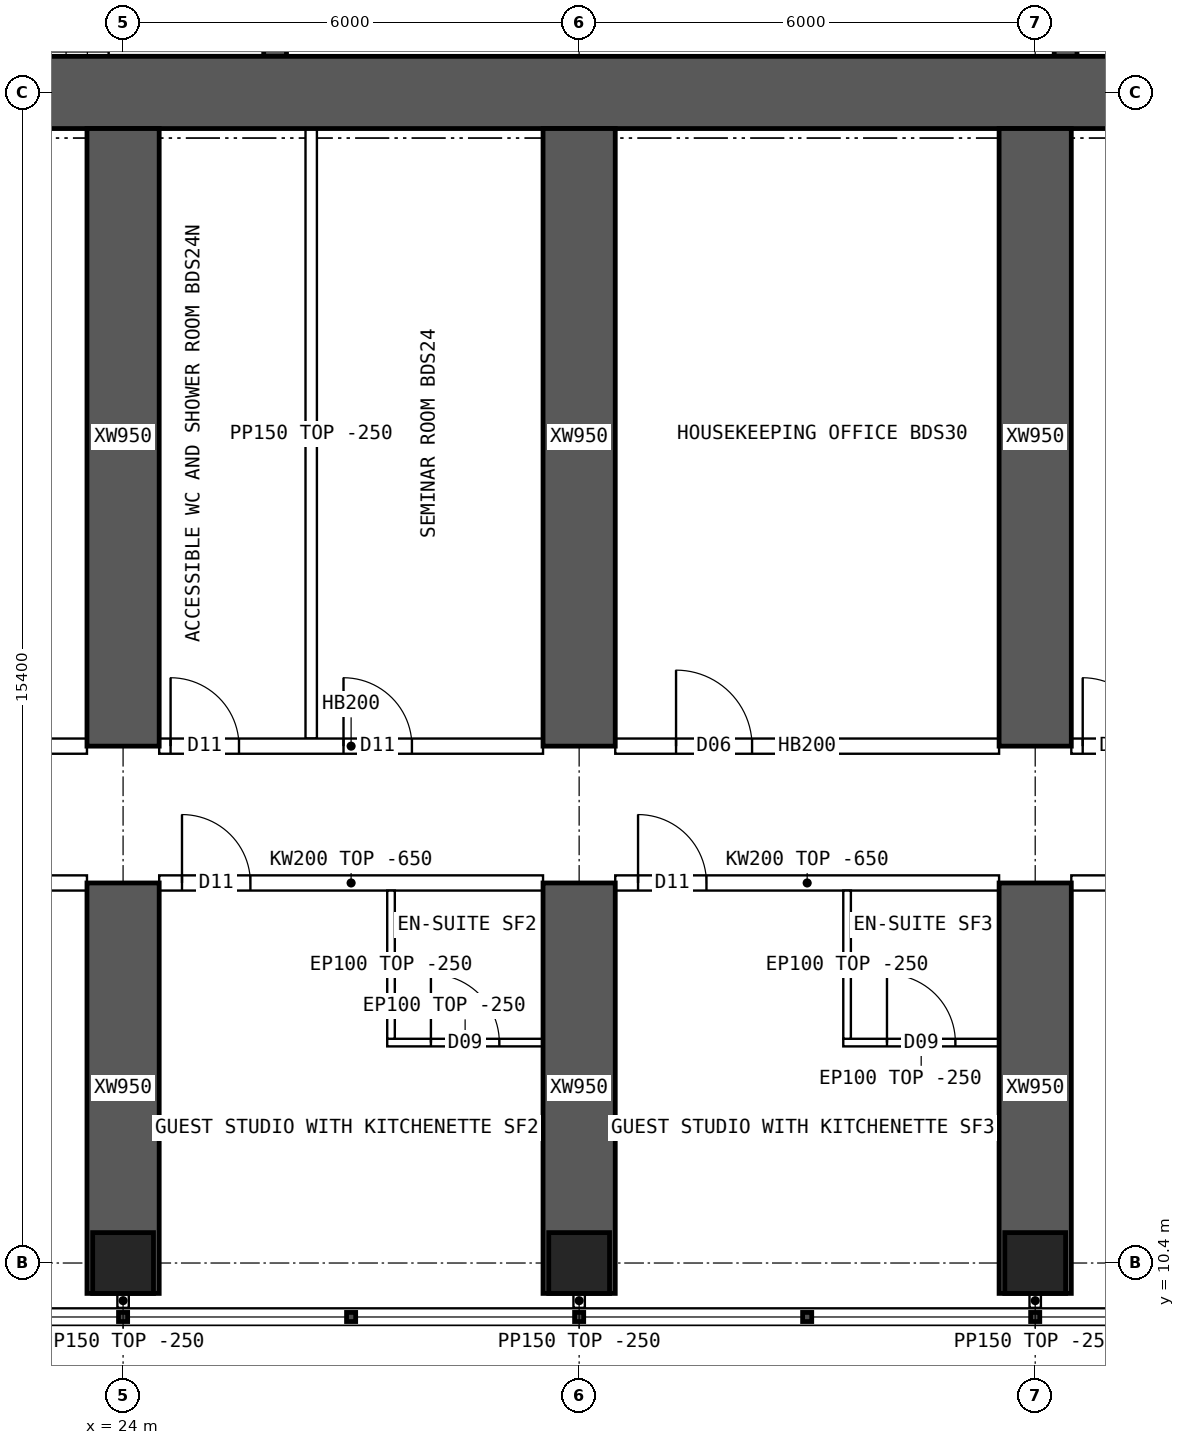
"""IFC4 building model, lengths in metres.
Left out: names, types, materials, properties, quantities, classifications, styles, units other than length and angle.
Written with IfcOpenShell. Run it as: python <this file> out.ifc"""

import sys

from ifc_helpers import new_model, si_unit, direction, frame, frame_2d, origin, origin_2d, place, context, subcontext, project, spatial, polyline, rectangle, hollow_rectangle, outline, extrude, element, fill, save


model = new_model("IFC4")
c1 = context("Model", 3, precision=1e-05, world=origin(), true_north=direction((0.0, 1.0)))
c2 = subcontext(c1, "Body", "Model", "MODEL_VIEW")
j1 = project(units=[si_unit("LENGTHUNIT", "METRE"), si_unit("PLANEANGLEUNIT", "RADIAN")], contexts=[c1])
p1 = place(None, origin())
s1 = spatial("IfcSite", under=j1, at=p1, CompositionType="ELEMENT")
p2 = place(p1, origin())
s2 = spatial("IfcBuilding", under=s1, at=p2, CompositionType="ELEMENT")
p3 = place(p2, frame((0.0, 0.0, 140.35)))
s3 = spatial("IfcBuildingStorey", under=s2, at=p3, CompositionType="ELEMENT", Elevation=140.35)
for number, where, z_axis, x_axis in (
    (1, (24.0, 10.4, 0.0), (0.0, 0.0, 1.0), (1.0, 0.0, 0.0)),
    (2, (30.0, 10.4, 0.0), (0.0, 0.0, 1.0), (1.0, 0.0, 0.0)),
    (3, (36.0, 10.4, 0.0), (0.0, 0.0, 1.0), (1.0, 0.0, 0.0)),
):
    element("IfcColumn", number, at=place(p3, frame(where, z_axis=z_axis, x_axis=x_axis)), inside=s3, PredefinedType="COLUMN", context=c2, shape_type="SweptSolid", body=[
        extrude(hollow_rectangle(XDim=0.8, YDim=0.8, WallThickness=0.08, at=origin_2d()), origin(), (0.0, 0.0, 1.0), 4.5),
    ])
p4 = place(p3, frame((18.0, 25.8, 0.0), z_axis=(0.0, 0.0, 1.0), x_axis=(1.0, 0.0, 0.0)))
e4 = element("IfcWall", 4, at=p4, inside=s3, PredefinedType="SHEAR", context=c2, shape_type="SweptSolid", body=[
    extrude(rectangle(XDim=48.0, YDim=0.95, at=frame_2d((24.0, 0.0))), origin(), (0.0, 0.0, 1.0), 4.5),
])
for number, where, z_axis, x_axis in (
    (5, (26.0, 26.275, 0.0), (0.0, 0.0, 1.0), (0.0, 1.0, 0.0)),
    (6, (36.4, 26.275, 0.0), (0.0, 0.0, 1.0), (0.0, 1.0, 0.0)),
):
    element("IfcWall", number, at=place(p3, frame(where, z_axis=z_axis, x_axis=x_axis)), inside=s3, PredefinedType="SHEAR", context=c2, shape_type="SweptSolid", body=[
        extrude(rectangle(XDim=3.975, YDim=0.3, at=frame_2d((1.988, 0.0))), origin(), (0.0, 0.0, 1.0), 4.5),
    ])
p5 = place(p3, frame((24.0, 10.0, 0.0), z_axis=(0.0, 0.0, 1.0), x_axis=(0.0, 1.0, 0.0)))
e7 = element("IfcWall", 7, at=p5, inside=s3, PredefinedType="SHEAR", context=c2, shape_type="SweptSolid", body=[
    extrude(rectangle(XDim=5.4, YDim=0.95, at=frame_2d((2.7, 0.0))), origin(), (0.0, 0.0, 1.0), 4.5),
])
p6 = place(p3, frame((24.0, 17.2, 0.0), z_axis=(0.0, 0.0, 1.0), x_axis=(0.0, 1.0, 0.0)))
e8 = element("IfcWall", 8, at=p6, inside=s3, PredefinedType="SHEAR", context=c2, shape_type="SweptSolid", body=[
    extrude(rectangle(XDim=8.125, YDim=0.95, at=frame_2d((4.062, 0.0))), origin(), (0.0, 0.0, 1.0), 4.5),
])
p7 = place(p3, frame((30.0, 10.0, 0.0), z_axis=(0.0, 0.0, 1.0), x_axis=(0.0, 1.0, 0.0)))
e9 = element("IfcWall", 9, at=p7, inside=s3, PredefinedType="SHEAR", context=c2, shape_type="SweptSolid", body=[
    extrude(rectangle(XDim=5.4, YDim=0.95, at=frame_2d((2.7, 0.0))), origin(), (0.0, 0.0, 1.0), 4.5),
])
p8 = place(p3, frame((30.0, 17.2, 0.0), z_axis=(0.0, 0.0, 1.0), x_axis=(0.0, 1.0, 0.0)))
e10 = element("IfcWall", 10, at=p8, inside=s3, PredefinedType="SHEAR", context=c2, shape_type="SweptSolid", body=[
    extrude(rectangle(XDim=8.125, YDim=0.95, at=frame_2d((4.062, 0.0))), origin(), (0.0, 0.0, 1.0), 4.5),
])
p9 = place(p3, frame((36.0, 10.0, 0.0), z_axis=(0.0, 0.0, 1.0), x_axis=(0.0, 1.0, 0.0)))
e11 = element("IfcWall", 11, at=p9, inside=s3, PredefinedType="SHEAR", context=c2, shape_type="SweptSolid", body=[
    extrude(rectangle(XDim=5.4, YDim=0.95, at=frame_2d((2.7, 0.0))), origin(), (0.0, 0.0, 1.0), 4.5),
])
p10 = place(p3, frame((36.0, 17.2, 0.0), z_axis=(0.0, 0.0, 1.0), x_axis=(0.0, 1.0, 0.0)))
e12 = element("IfcWall", 12, at=p10, inside=s3, PredefinedType="SHEAR", context=c2, shape_type="SweptSolid", body=[
    extrude(rectangle(XDim=8.125, YDim=0.95, at=frame_2d((4.062, 0.0))), origin(), (0.0, 0.0, 1.0), 4.5),
])
p11 = place(p3, frame((18.475, 15.4, 0.0), z_axis=(0.0, 0.0, 1.0), x_axis=(1.0, 0.0, 0.0)))
e13 = element("IfcWall", 13, at=p11, inside=s3, PredefinedType="SOLIDWALL", context=c2, shape_type="SweptSolid", body=[
    extrude(outline(polyline([(0.0, 0.0), (5.05, 0.0), (5.05, 3.85), (0.0, 3.85), (0.0, 0.0)])), frame((0.0, 0.1, 0.0), z_axis=(0.0, -1.0, 0.0), x_axis=(1.0, 0.0, 0.0)), (0.0, 0.0, 1.0), 0.2),
])
p12 = place(p11, frame((1.0, 0.0, 0.0)))
e14 = element("IfcOpeningElement", 14, at=p12, cuts=e13, PredefinedType="OPENING", context=c2, shape_type="SweptSolid", body=[
    extrude(rectangle(XDim=1.8, YDim=2.1, at=frame_2d((0.9, 1.05))), frame((0.0, 0.11, 0.0), z_axis=(0.0, -1.0, 0.0), x_axis=(1.0, 0.0, 0.0)), (0.0, 0.0, 1.0), 0.22),
])
p13 = place(p3, frame((18.475, 17.2, 0.0), z_axis=(0.0, 0.0, 1.0), x_axis=(1.0, 0.0, 0.0)))
e15 = element("IfcWall", 15, at=p13, inside=s3, PredefinedType="SOLIDWALL", context=c2, shape_type="SweptSolid", body=[
    extrude(rectangle(XDim=5.05, YDim=0.2, at=frame_2d((2.525, 0.0))), origin(), (0.0, 0.0, 1.0), 4.25),
])
p14 = place(p13, frame((0.8, 0.0, 0.0)))
e16 = element("IfcOpeningElement", 16, at=p14, cuts=e15, PredefinedType="OPENING", context=c2, shape_type="SweptSolid", body=[
    extrude(rectangle(XDim=1.0, YDim=2.1, at=frame_2d((0.5, 1.05))), frame((0.0, 0.11, 0.0), z_axis=(0.0, -1.0, 0.0), x_axis=(1.0, 0.0, 0.0)), (0.0, 0.0, 1.0), 0.22),
])
p15 = place(p3, frame((24.475, 15.4, 0.0), z_axis=(0.0, 0.0, 1.0), x_axis=(1.0, 0.0, 0.0)))
e17 = element("IfcWall", 17, at=p15, inside=s3, PredefinedType="SOLIDWALL", context=c2, shape_type="SweptSolid", body=[
    extrude(outline(polyline([(0.0, 0.0), (5.05, 0.0), (5.05, 3.85), (0.0, 3.85), (0.0, 0.0)])), frame((0.0, 0.1, 0.0), z_axis=(0.0, -1.0, 0.0), x_axis=(1.0, 0.0, 0.0)), (0.0, 0.0, 1.0), 0.2),
])
p16 = place(p15, frame((0.3, 0.0, 0.0)))
e18 = element("IfcOpeningElement", 18, at=p16, cuts=e17, PredefinedType="OPENING", context=c2, shape_type="SweptSolid", body=[
    extrude(rectangle(XDim=0.9, YDim=2.1, at=frame_2d((0.45, 1.05))), frame((0.0, 0.11, 0.0), z_axis=(0.0, -1.0, 0.0), x_axis=(1.0, 0.0, 0.0)), (0.0, 0.0, 1.0), 0.22),
])
p17 = place(p3, frame((24.475, 17.2, 0.0), z_axis=(0.0, 0.0, 1.0), x_axis=(1.0, 0.0, 0.0)))
e19 = element("IfcWall", 19, at=p17, inside=s3, PredefinedType="SOLIDWALL", context=c2, shape_type="SweptSolid", body=[
    extrude(rectangle(XDim=5.05, YDim=0.2, at=frame_2d((2.525, 0.0))), origin(), (0.0, 0.0, 1.0), 4.25),
])
p18 = place(p17, frame((0.15, 0.0, 0.0)))
e20 = element("IfcOpeningElement", 20, at=p18, cuts=e19, PredefinedType="OPENING", context=c2, shape_type="SweptSolid", body=[
    extrude(rectangle(XDim=0.9, YDim=2.1, at=frame_2d((0.45, 1.05))), frame((0.0, 0.11, 0.0), z_axis=(0.0, -1.0, 0.0), x_axis=(1.0, 0.0, 0.0)), (0.0, 0.0, 1.0), 0.22),
])
p19 = place(p17, frame((2.425, 0.0, 0.0)))
e21 = element("IfcOpeningElement", 21, at=p19, cuts=e19, PredefinedType="OPENING", context=c2, shape_type="SweptSolid", body=[
    extrude(rectangle(XDim=0.9, YDim=2.1, at=frame_2d((0.45, 1.05))), frame((0.0, 0.11, 0.0), z_axis=(0.0, -1.0, 0.0), x_axis=(1.0, 0.0, 0.0)), (0.0, 0.0, 1.0), 0.22),
])
p20 = place(p3, frame((30.475, 15.4, 0.0), z_axis=(0.0, 0.0, 1.0), x_axis=(1.0, 0.0, 0.0)))
e22 = element("IfcWall", 22, at=p20, inside=s3, PredefinedType="SOLIDWALL", context=c2, shape_type="SweptSolid", body=[
    extrude(outline(polyline([(0.0, 0.0), (5.05, 0.0), (5.05, 3.85), (0.0, 3.85), (0.0, 0.0)])), frame((0.0, 0.1, 0.0), z_axis=(0.0, -1.0, 0.0), x_axis=(1.0, 0.0, 0.0)), (0.0, 0.0, 1.0), 0.2),
])
p21 = place(p20, frame((0.3, 0.0, 0.0)))
e23 = element("IfcOpeningElement", 23, at=p21, cuts=e22, PredefinedType="OPENING", context=c2, shape_type="SweptSolid", body=[
    extrude(rectangle(XDim=0.9, YDim=2.1, at=frame_2d((0.45, 1.05))), frame((0.0, 0.11, 0.0), z_axis=(0.0, -1.0, 0.0), x_axis=(1.0, 0.0, 0.0)), (0.0, 0.0, 1.0), 0.22),
])
p22 = place(p3, frame((30.475, 17.2, 0.0), z_axis=(0.0, 0.0, 1.0), x_axis=(1.0, 0.0, 0.0)))
e24 = element("IfcWall", 24, at=p22, inside=s3, PredefinedType="SOLIDWALL", context=c2, shape_type="SweptSolid", body=[
    extrude(rectangle(XDim=5.05, YDim=0.2, at=frame_2d((2.525, 0.0))), origin(), (0.0, 0.0, 1.0), 4.25),
])
p23 = place(p22, frame((0.8, 0.0, 0.0)))
e25 = element("IfcOpeningElement", 25, at=p23, cuts=e24, PredefinedType="OPENING", context=c2, shape_type="SweptSolid", body=[
    extrude(rectangle(XDim=1.0, YDim=2.1, at=frame_2d((0.5, 1.05))), frame((0.0, 0.11, 0.0), z_axis=(0.0, -1.0, 0.0), x_axis=(1.0, 0.0, 0.0)), (0.0, 0.0, 1.0), 0.22),
])
p24 = place(p3, frame((36.475, 15.4, 0.0), z_axis=(0.0, 0.0, 1.0), x_axis=(1.0, 0.0, 0.0)))
e26 = element("IfcWall", 26, at=p24, inside=s3, PredefinedType="SOLIDWALL", context=c2, shape_type="SweptSolid", body=[
    extrude(outline(polyline([(0.0, 0.0), (5.05, 0.0), (5.05, 3.85), (0.0, 3.85), (0.0, 0.0)])), frame((0.0, 0.1, 0.0), z_axis=(0.0, -1.0, 0.0), x_axis=(1.0, 0.0, 0.0)), (0.0, 0.0, 1.0), 0.2),
])
p25 = place(p24, frame((1.0, 0.0, 0.0)))
e27 = element("IfcOpeningElement", 27, at=p25, cuts=e26, PredefinedType="OPENING", context=c2, shape_type="SweptSolid", body=[
    extrude(rectangle(XDim=1.8, YDim=2.1, at=frame_2d((0.9, 1.05))), frame((0.0, 0.11, 0.0), z_axis=(0.0, -1.0, 0.0), x_axis=(1.0, 0.0, 0.0)), (0.0, 0.0, 1.0), 0.22),
])
p26 = place(p3, frame((36.475, 17.2, 0.0), z_axis=(0.0, 0.0, 1.0), x_axis=(1.0, 0.0, 0.0)))
e28 = element("IfcWall", 28, at=p26, inside=s3, PredefinedType="SOLIDWALL", context=c2, shape_type="SweptSolid", body=[
    extrude(rectangle(XDim=5.05, YDim=0.2, at=frame_2d((2.525, 0.0))), origin(), (0.0, 0.0, 1.0), 4.25),
])
p27 = place(p26, frame((0.15, 0.0, 0.0)))
e29 = element("IfcOpeningElement", 29, at=p27, cuts=e28, PredefinedType="OPENING", context=c2, shape_type="SweptSolid", body=[
    extrude(rectangle(XDim=0.9, YDim=2.1, at=frame_2d((0.45, 1.05))), frame((0.0, 0.11, 0.0), z_axis=(0.0, -1.0, 0.0), x_axis=(1.0, 0.0, 0.0)), (0.0, 0.0, 1.0), 0.22),
])
p28 = place(p26, frame((2.785, 0.0, 0.0)))
e30 = element("IfcOpeningElement", 30, at=p28, cuts=e28, PredefinedType="OPENING", context=c2, shape_type="SweptSolid", body=[
    extrude(rectangle(XDim=0.9, YDim=2.1, at=frame_2d((0.45, 1.05))), frame((0.0, 0.11, 0.0), z_axis=(0.0, -1.0, 0.0), x_axis=(1.0, 0.0, 0.0)), (0.0, 0.0, 1.0), 0.22),
])
p29 = place(p3, frame((29.525, 13.3, 0.0), z_axis=(0.0, 0.0, 1.0), x_axis=(-1.0, 0.0, 0.0)))
e31 = element("IfcWall", 31, at=p29, inside=s3, PredefinedType="PARTITIONING", context=c2, shape_type="SweptSolid", body=[
    extrude(rectangle(XDim=2.05, YDim=0.1, at=frame_2d((1.025, 0.0))), origin(), (0.0, 0.0, 1.0), 4.25),
])
p30 = place(p29, frame((0.575, 0.0, 0.0)))
e32 = element("IfcOpeningElement", 32, at=p30, cuts=e31, PredefinedType="OPENING", context=c2, shape_type="SweptSolid", body=[
    extrude(rectangle(XDim=0.9, YDim=2.1, at=frame_2d((0.45, 1.05))), frame((0.0, 0.06, 0.0), z_axis=(0.0, -1.0, 0.0), x_axis=(1.0, 0.0, 0.0)), (0.0, 0.0, 1.0), 0.12),
])
p31 = place(p3, frame((27.525, 13.35, 0.0), z_axis=(0.0, 0.0, 1.0), x_axis=(0.0, 1.0, 0.0)))
e33 = element("IfcWall", 33, at=p31, inside=s3, PredefinedType="PARTITIONING", context=c2, shape_type="SweptSolid", body=[
    extrude(outline(polyline([(0.0, 0.0), (1.95, 0.0), (1.95, 3.85), (1.902, 3.85), (1.9, 4.25), (0.0, 4.25), (0.0, 0.0)])), frame((0.0, 0.05, 0.0), z_axis=(0.0, -1.0, 0.0), x_axis=(1.0, 0.0, 0.0)), (0.0, 0.0, 1.0), 0.1),
])
p32 = place(p3, frame((35.525, 13.3, 0.0), z_axis=(0.0, 0.0, 1.0), x_axis=(-1.0, 0.0, 0.0)))
e34 = element("IfcWall", 34, at=p32, inside=s3, PredefinedType="PARTITIONING", context=c2, shape_type="SweptSolid", body=[
    extrude(rectangle(XDim=2.05, YDim=0.1, at=frame_2d((1.025, 0.0))), origin(), (0.0, 0.0, 1.0), 4.25),
])
p33 = place(p32, frame((0.575, 0.0, 0.0)))
e35 = element("IfcOpeningElement", 35, at=p33, cuts=e34, PredefinedType="OPENING", context=c2, shape_type="SweptSolid", body=[
    extrude(rectangle(XDim=0.9, YDim=2.1, at=frame_2d((0.45, 1.05))), frame((0.0, 0.06, 0.0), z_axis=(0.0, -1.0, 0.0), x_axis=(1.0, 0.0, 0.0)), (0.0, 0.0, 1.0), 0.12),
])
p34 = place(p3, frame((33.525, 13.35, 0.0), z_axis=(0.0, 0.0, 1.0), x_axis=(0.0, 1.0, 0.0)))
e36 = element("IfcWall", 36, at=p34, inside=s3, PredefinedType="PARTITIONING", context=c2, shape_type="SweptSolid", body=[
    extrude(outline(polyline([(0.0, 0.0), (1.95, 0.0), (1.95, 3.85), (1.902, 3.85), (1.9, 4.25), (0.0, 4.25), (0.0, 0.0)])), frame((0.0, 0.05, 0.0), z_axis=(0.0, -1.0, 0.0), x_axis=(1.0, 0.0, 0.0)), (0.0, 0.0, 1.0), 0.1),
])
p35 = place(p3, frame((26.475, 17.3, 0.0), z_axis=(0.0, 0.0, 1.0), x_axis=(0.0, 1.0, 0.0)))
e37 = element("IfcWall", 37, at=p35, inside=s3, PredefinedType="PARTITIONING", context=c2, shape_type="SweptSolid", body=[
    extrude(rectangle(XDim=8.025, YDim=0.15, at=frame_2d((4.012, 0.0))), origin(), (0.0, 0.0, 1.0), 4.25),
])
for number, where, z_axis, x_axis in (
    (38, (24.0, 10.0, 0.0), (0.0, 0.0, 1.0), (0.0, -1.0, 0.0)),
    (39, (30.0, 10.0, 0.0), (0.0, 0.0, 1.0), (0.0, -1.0, 0.0)),
    (40, (36.0, 10.0, 0.0), (0.0, 0.0, 1.0), (0.0, -1.0, 0.0)),
):
    element("IfcWall", number, at=place(p3, frame(where, z_axis=z_axis, x_axis=x_axis)), inside=s3, PredefinedType="PARTITIONING", context=c2, shape_type="SweptSolid", body=[
        extrude(rectangle(XDim=0.19, YDim=0.15, at=frame_2d((0.095, 0.0))), origin(), (0.0, 0.0, 1.0), 4.25),
    ])
p36 = place(p30, origin())
e41 = element("IfcDoor", 41, at=p36, inside=s3, OperationType="SINGLE_SWING_RIGHT", PredefinedType="DOOR", context=c2, shape_type="SweptSolid", body=[
    extrude(rectangle(XDim=0.9, YDim=2.1, at=frame_2d((0.45, 1.05))), frame((0.0, 0.025, 0.0), z_axis=(0.0, -1.0, 0.0), x_axis=(1.0, 0.0, 0.0)), (0.0, 0.0, 1.0), 0.05),
])
fill(e32, e41)
p37 = place(p16, origin())
e42 = element("IfcDoor", 42, at=p37, inside=s3, OperationType="SINGLE_SWING_LEFT", PredefinedType="DOOR", context=c2, shape_type="SweptSolid", body=[
    extrude(rectangle(XDim=0.9, YDim=2.1, at=frame_2d((0.45, 1.05))), frame((0.0, 0.025, 0.0), z_axis=(0.0, -1.0, 0.0), x_axis=(1.0, 0.0, 0.0)), (0.0, 0.0, 1.0), 0.05),
])
fill(e18, e42)
p38 = place(p33, origin())
e43 = element("IfcDoor", 43, at=p38, inside=s3, OperationType="SINGLE_SWING_RIGHT", PredefinedType="DOOR", context=c2, shape_type="SweptSolid", body=[
    extrude(rectangle(XDim=0.9, YDim=2.1, at=frame_2d((0.45, 1.05))), frame((0.0, 0.025, 0.0), z_axis=(0.0, -1.0, 0.0), x_axis=(1.0, 0.0, 0.0)), (0.0, 0.0, 1.0), 0.05),
])
fill(e35, e43)
p39 = place(p21, origin())
e44 = element("IfcDoor", 44, at=p39, inside=s3, OperationType="SINGLE_SWING_LEFT", PredefinedType="DOOR", context=c2, shape_type="SweptSolid", body=[
    extrude(rectangle(XDim=0.9, YDim=2.1, at=frame_2d((0.45, 1.05))), frame((0.0, 0.025, 0.0), z_axis=(0.0, -1.0, 0.0), x_axis=(1.0, 0.0, 0.0)), (0.0, 0.0, 1.0), 0.05),
])
fill(e23, e44)
p40 = place(p18, origin())
e45 = element("IfcDoor", 45, at=p40, inside=s3, OperationType="SINGLE_SWING_LEFT", PredefinedType="DOOR", context=c2, shape_type="SweptSolid", body=[
    extrude(rectangle(XDim=0.9, YDim=2.1, at=frame_2d((0.45, 1.05))), frame((0.0, 0.025, 0.0), z_axis=(0.0, -1.0, 0.0), x_axis=(1.0, 0.0, 0.0)), (0.0, 0.0, 1.0), 0.05),
])
fill(e20, e45)
p41 = place(p19, origin())
e46 = element("IfcDoor", 46, at=p41, inside=s3, OperationType="SINGLE_SWING_LEFT", PredefinedType="DOOR", context=c2, shape_type="SweptSolid", body=[
    extrude(rectangle(XDim=0.9, YDim=2.1, at=frame_2d((0.45, 1.05))), frame((0.0, 0.025, 0.0), z_axis=(0.0, -1.0, 0.0), x_axis=(1.0, 0.0, 0.0)), (0.0, 0.0, 1.0), 0.05),
])
fill(e21, e46)
p42 = place(p23, origin())
e47 = element("IfcDoor", 47, at=p42, inside=s3, OperationType="SINGLE_SWING_LEFT", PredefinedType="DOOR", context=c2, shape_type="SweptSolid", body=[
    extrude(rectangle(XDim=1.0, YDim=2.1, at=frame_2d((0.5, 1.05))), frame((0.0, 0.025, 0.0), z_axis=(0.0, -1.0, 0.0), x_axis=(1.0, 0.0, 0.0)), (0.0, 0.0, 1.0), 0.05),
])
fill(e25, e47)
p43 = place(p27, origin())
e48 = element("IfcDoor", 48, at=p43, inside=s3, OperationType="SINGLE_SWING_LEFT", PredefinedType="DOOR", context=c2, shape_type="SweptSolid", body=[
    extrude(rectangle(XDim=0.9, YDim=2.1, at=frame_2d((0.45, 1.05))), frame((0.0, 0.025, 0.0), z_axis=(0.0, -1.0, 0.0), x_axis=(1.0, 0.0, 0.0)), (0.0, 0.0, 1.0), 0.05),
])
fill(e29, e48)
save(model, sys.argv[1])
